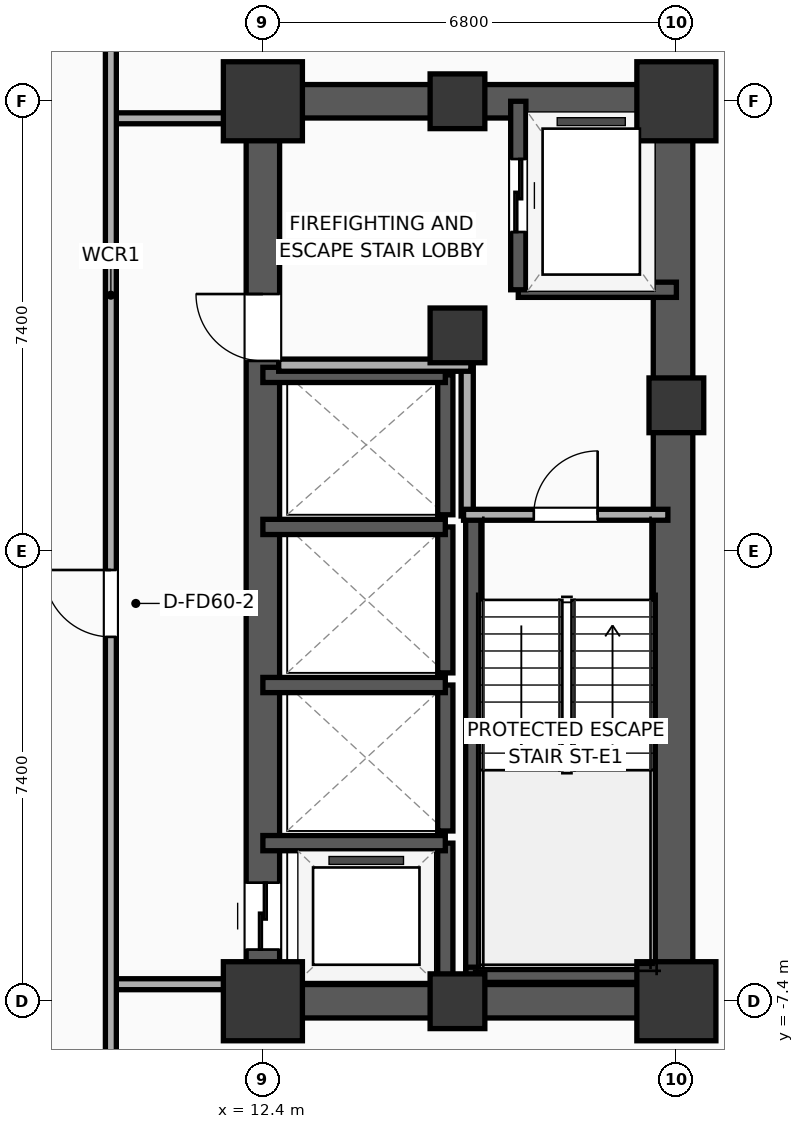
"""IFC4 building model, lengths in metres.
Left out: names, types, materials, properties, quantities, classifications, styles, units other than length and angle.
Written with IfcOpenShell. Run it as: python <this file> out.ifc"""

import sys

from ifc_helpers import new_model, si_unit, direction, frame, frame_2d, origin, origin_2d, place, context, subcontext, project, spatial, rectangle, extrude, element, fill, save


model = new_model("IFC4")
c1 = context("Model", 3, precision=1e-05, world=origin(), true_north=direction((0.0, 1.0)))
c2 = subcontext(c1, "Body", "Model", "MODEL_VIEW")
j1 = project(units=[si_unit("LENGTHUNIT", "METRE"), si_unit("PLANEANGLEUNIT", "RADIAN")], contexts=[c1])
p1 = place(None, origin())
s1 = spatial("IfcSite", under=j1, at=p1, CompositionType="ELEMENT")
p2 = place(p1, origin())
s2 = spatial("IfcBuilding", under=s1, at=p2, CompositionType="ELEMENT")
p3 = place(p2, frame((0.0, 0.0, 113.1)))
s3 = spatial("IfcBuildingStorey", under=s2, at=p3, CompositionType="ELEMENT", Elevation=113.1)
p4 = place(p3, frame((12.4, -7.4, 0.0), z_axis=(0.0, 0.0, 1.0), x_axis=(1.0, 0.0, 0.0)))
e1 = element("IfcColumn", 1, at=p4, inside=s3, PredefinedType="COLUMN", context=c2, shape_type="SweptSolid", body=[
    extrude(rectangle(XDim=1.3, YDim=1.3, at=origin_2d()), origin(), (0.0, 0.0, 1.0), 3.9),
])
p5 = place(p3, frame((15.6, 3.55, 0.0), z_axis=(0.0, 0.0, 1.0), x_axis=(1.0, 0.0, 0.0)))
e2 = element("IfcColumn", 2, at=p5, inside=s3, PredefinedType="COLUMN", context=c2, shape_type="SweptSolid", body=[
    extrude(rectangle(XDim=0.9, YDim=0.9, at=origin_2d()), origin(), (0.0, 0.0, 1.0), 3.9),
])
p6 = place(p3, frame((12.4, 7.4, 0.0), z_axis=(0.0, 0.0, 1.0), x_axis=(1.0, 0.0, 0.0)))
e3 = element("IfcColumn", 3, at=p6, inside=s3, PredefinedType="COLUMN", context=c2, shape_type="SweptSolid", body=[
    extrude(rectangle(XDim=1.3, YDim=1.3, at=origin_2d()), origin(), (0.0, 0.0, 1.0), 3.9),
])
for number, where, z_axis, x_axis in (
    (4, (15.6, -7.4, 0.0), (0.0, 0.0, 1.0), (1.0, 0.0, 0.0)),
    (5, (15.6, 7.4, 0.0), (0.0, 0.0, 1.0), (1.0, 0.0, 0.0)),
):
    element("IfcColumn", number, at=place(p3, frame(where, z_axis=z_axis, x_axis=x_axis)), inside=s3, PredefinedType="COLUMN", context=c2, shape_type="SweptSolid", body=[
        extrude(rectangle(XDim=0.9, YDim=0.9, at=origin_2d()), origin(), (0.0, 0.0, 1.0), 3.9),
    ])
p7 = place(p3, frame((19.2, -7.4, 0.0), z_axis=(0.0, 0.0, 1.0), x_axis=(1.0, 0.0, 0.0)))
e6 = element("IfcColumn", 6, at=p7, inside=s3, PredefinedType="COLUMN", context=c2, shape_type="SweptSolid", body=[
    extrude(rectangle(XDim=1.3, YDim=1.3, at=origin_2d()), origin(), (0.0, 0.0, 1.0), 3.9),
])
p8 = place(p3, frame((19.2, 2.4, 0.0), z_axis=(0.0, 0.0, 1.0), x_axis=(1.0, 0.0, 0.0)))
e7 = element("IfcColumn", 7, at=p8, inside=s3, PredefinedType="COLUMN", context=c2, shape_type="SweptSolid", body=[
    extrude(rectangle(XDim=0.9, YDim=0.9, at=origin_2d()), origin(), (0.0, 0.0, 1.0), 3.9),
])
p9 = place(p3, frame((19.2, 7.4, 0.0), z_axis=(0.0, 0.0, 1.0), x_axis=(1.0, 0.0, 0.0)))
e8 = element("IfcColumn", 8, at=p9, inside=s3, PredefinedType="COLUMN", context=c2, shape_type="SweptSolid", body=[
    extrude(rectangle(XDim=1.3, YDim=1.3, at=origin_2d()), origin(), (0.0, 0.0, 1.0), 3.9),
])
for number, where, z_axis, x_axis in (
    (9, (12.125, -7.4, 0.0), (0.0, 0.0, 1.0), (1.0, 0.0, 0.0)),
    (10, (12.125, 7.4, 0.0), (0.0, 0.0, 1.0), (1.0, 0.0, 0.0)),
):
    element("IfcWall", number, at=place(p3, frame(where, z_axis=z_axis, x_axis=x_axis)), inside=s3, PredefinedType="SHEAR", context=c2, shape_type="SweptSolid", body=[
        extrude(rectangle(XDim=7.35, YDim=0.55, at=frame_2d((3.675, 0.0))), origin(), (0.0, 0.0, 1.0), 3.65),
    ])
p10 = place(p3, frame((12.4, -7.4, 0.0), z_axis=(0.0, 0.0, 1.0), x_axis=(0.0, 1.0, 0.0)))
e11 = element("IfcWall", 11, at=p10, inside=s3, PredefinedType="SHEAR", context=c2, shape_type="SweptSolid", body=[
    extrude(rectangle(XDim=14.8, YDim=0.55, at=frame_2d((7.4, 0.0))), origin(), (0.0, 0.0, 1.0), 3.65),
])
p11 = place(p10, frame((0.85, 0.0, 0.0)))
e12 = element("IfcOpeningElement", 12, at=p11, cuts=e11, PredefinedType="OPENING", context=c2, shape_type="SweptSolid", body=[
    extrude(rectangle(XDim=1.1, YDim=2.05, at=frame_2d((0.55, 1.025))), frame((0.0, 0.285, 0.0), z_axis=(0.0, -1.0, 0.0), x_axis=(1.0, 0.0, 0.0)), (0.0, 0.0, 1.0), 0.57),
])
p12 = place(p10, frame((10.53, 0.0, 0.0)))
e13 = element("IfcOpeningElement", 13, at=p12, cuts=e11, PredefinedType="OPENING", context=c2, shape_type="SweptSolid", body=[
    extrude(rectangle(XDim=1.1, YDim=2.05, at=frame_2d((0.55, 1.025))), frame((0.0, 0.285, 0.0), z_axis=(0.0, -1.0, 0.0), x_axis=(1.0, 0.0, 0.0)), (0.0, 0.0, 1.0), 0.57),
])
p13 = place(p3, frame((19.145, -7.4, 0.0), z_axis=(0.0, 0.0, 1.0), x_axis=(0.0, 1.0, 0.0)))
e14 = element("IfcWall", 14, at=p13, inside=s3, PredefinedType="SHEAR", context=c2, shape_type="SweptSolid", body=[
    extrude(rectangle(XDim=14.8, YDim=0.65, at=frame_2d((7.4, 0.0))), origin(), (0.0, 0.0, 1.0), 3.65),
])
p14 = place(p3, frame((15.86, -7.085, 0.0), z_axis=(0.0, 0.0, 1.0), x_axis=(0.0, 1.0, 0.0)))
e15 = element("IfcWall", 15, at=p14, inside=s3, PredefinedType="SOLIDWALL", context=c2, shape_type="SweptSolid", body=[
    extrude(rectangle(XDim=7.685, YDim=0.25, at=frame_2d((3.843, 0.0))), origin(), (0.0, 0.0, 1.0), 3.65),
])
p15 = place(p3, frame((15.74, -6.965, 0.0), z_axis=(0.0, 0.0, 1.0), x_axis=(1.0, 0.0, 0.0)))
e16 = element("IfcWall", 16, at=p15, inside=s3, PredefinedType="SOLIDWALL", context=c2, shape_type="SweptSolid", body=[
    extrude(rectangle(XDim=3.46, YDim=0.25, at=frame_2d((1.73, 0.0))), origin(), (0.0, 0.0, 1.0), 3.65),
])
p16 = place(p3, frame((16.6, 4.3, 0.0), z_axis=(0.0, 0.0, 1.0), x_axis=(1.0, 0.0, 0.0)))
e17 = element("IfcWall", 17, at=p16, inside=s3, PredefinedType="SOLIDWALL", context=c2, shape_type="SweptSolid", body=[
    extrude(rectangle(XDim=2.6, YDim=0.25, at=frame_2d((1.3, 0.0))), origin(), (0.0, 0.0, 1.0), 3.65),
])
p17 = place(p3, frame((16.6, 7.4, 0.0), z_axis=(0.0, 0.0, 1.0), x_axis=(0.0, -1.0, 0.0)))
e18 = element("IfcWall", 18, at=p17, inside=s3, PredefinedType="SOLIDWALL", context=c2, shape_type="SweptSolid", body=[
    extrude(rectangle(XDim=3.1, YDim=0.25, at=frame_2d((1.55, 0.0))), origin(), (0.0, 0.0, 1.0), 3.65),
])
p18 = place(p17, frame((0.95, 0.0, 0.0)))
e19 = element("IfcOpeningElement", 19, at=p18, cuts=e18, PredefinedType="OPENING", context=c2, shape_type="SweptSolid", body=[
    extrude(rectangle(XDim=1.2, YDim=2.05, at=frame_2d((0.6, 1.025))), frame((0.0, 0.135, 0.0), z_axis=(0.0, -1.0, 0.0), x_axis=(1.0, 0.0, 0.0)), (0.0, 0.0, 1.0), 0.27),
])
p19 = place(p3, frame((15.4, -7.4, 0.0), z_axis=(0.0, 0.0, 1.0), x_axis=(0.0, 1.0, 0.0)))
e20 = element("IfcWall", 20, at=p19, inside=s3, PredefinedType="SOLIDWALL", context=c2, shape_type="SweptSolid", body=[
    extrude(rectangle(XDim=2.6, YDim=0.25, at=frame_2d((1.3, 0.0))), origin(), (0.0, 0.0, 1.0), 3.65),
])
p20 = place(p3, frame((15.4, -4.8, 0.0), z_axis=(0.0, 0.0, 1.0), x_axis=(-1.0, 0.0, 0.0)))
e21 = element("IfcWall", 21, at=p20, inside=s3, PredefinedType="SOLIDWALL", context=c2, shape_type="SweptSolid", body=[
    extrude(rectangle(XDim=3.0, YDim=0.25, at=frame_2d((1.5, 0.0))), origin(), (0.0, 0.0, 1.0), 3.65),
])
p21 = place(p3, frame((15.4, -4.6, 0.0), z_axis=(0.0, 0.0, 1.0), x_axis=(0.0, 1.0, 0.0)))
e22 = element("IfcWall", 22, at=p21, inside=s3, PredefinedType="SOLIDWALL", context=c2, shape_type="SweptSolid", body=[
    extrude(rectangle(XDim=2.4, YDim=0.25, at=frame_2d((1.2, 0.0))), origin(), (0.0, 0.0, 1.0), 3.65),
])
p22 = place(p3, frame((15.4, -2.2, 0.0), z_axis=(0.0, 0.0, 1.0), x_axis=(-1.0, 0.0, 0.0)))
e23 = element("IfcWall", 23, at=p22, inside=s3, PredefinedType="SOLIDWALL", context=c2, shape_type="SweptSolid", body=[
    extrude(rectangle(XDim=3.0, YDim=0.25, at=frame_2d((1.5, 0.0))), origin(), (0.0, 0.0, 1.0), 3.65),
])
p23 = place(p3, frame((15.4, -2.0, 0.0), z_axis=(0.0, 0.0, 1.0), x_axis=(0.0, 1.0, 0.0)))
e24 = element("IfcWall", 24, at=p23, inside=s3, PredefinedType="SOLIDWALL", context=c2, shape_type="SweptSolid", body=[
    extrude(rectangle(XDim=2.4, YDim=0.25, at=frame_2d((1.2, 0.0))), origin(), (0.0, 0.0, 1.0), 3.65),
])
p24 = place(p3, frame((15.4, 0.4, 0.0), z_axis=(0.0, 0.0, 1.0), x_axis=(-1.0, 0.0, 0.0)))
e25 = element("IfcWall", 25, at=p24, inside=s3, PredefinedType="SOLIDWALL", context=c2, shape_type="SweptSolid", body=[
    extrude(rectangle(XDim=3.0, YDim=0.25, at=frame_2d((1.5, 0.0))), origin(), (0.0, 0.0, 1.0), 3.65),
])
p25 = place(p3, frame((15.4, 0.6, 0.0), z_axis=(0.0, 0.0, 1.0), x_axis=(0.0, 1.0, 0.0)))
e26 = element("IfcWall", 26, at=p25, inside=s3, PredefinedType="SOLIDWALL", context=c2, shape_type="SweptSolid", body=[
    extrude(rectangle(XDim=2.3, YDim=0.25, at=frame_2d((1.15, 0.0))), origin(), (0.0, 0.0, 1.0), 3.65),
])
p26 = place(p3, frame((15.4, 2.9, 0.0), z_axis=(0.0, 0.0, 1.0), x_axis=(-1.0, 0.0, 0.0)))
e27 = element("IfcWall", 27, at=p26, inside=s3, PredefinedType="SOLIDWALL", context=c2, shape_type="SweptSolid", body=[
    extrude(rectangle(XDim=3.0, YDim=0.25, at=frame_2d((1.5, 0.0))), origin(), (0.0, 0.0, 1.0), 3.65),
])
p27 = place(p3, frame((15.76, 0.58, 0.0), z_axis=(0.0, 0.0, 1.0), x_axis=(0.0, 1.0, 0.0)))
e28 = element("IfcWall", 28, at=p27, inside=s3, PredefinedType="PARTITIONING", context=c2, shape_type="SweptSolid", body=[
    extrude(rectangle(XDim=2.52, YDim=0.2, at=frame_2d((1.26, 0.0))), origin(), (0.0, 0.0, 1.0), 3.65),
])
p28 = place(p3, frame((12.66, 3.06, 0.0), z_axis=(0.0, 0.0, 1.0), x_axis=(1.0, 0.0, 0.0)))
e29 = element("IfcWall", 29, at=p28, inside=s3, PredefinedType="PARTITIONING", context=c2, shape_type="SweptSolid", body=[
    extrude(rectangle(XDim=3.16, YDim=0.2, at=frame_2d((1.58, 0.0))), origin(), (0.0, 0.0, 1.0), 3.65),
])
p29 = place(p3, frame((15.7, 0.6, 0.0), z_axis=(0.0, 0.0, 1.0), x_axis=(1.0, 0.0, 0.0)))
e30 = element("IfcWall", 30, at=p29, inside=s3, PredefinedType="PARTITIONING", context=c2, shape_type="SweptSolid", body=[
    extrude(rectangle(XDim=3.36, YDim=0.18, at=frame_2d((1.68, 0.0))), origin(), (0.0, 0.0, 1.0), 3.65),
])
p30 = place(p29, frame((1.155, 0.0, 0.0)))
e31 = element("IfcOpeningElement", 31, at=p30, cuts=e30, PredefinedType="OPENING", context=c2, shape_type="SweptSolid", body=[
    extrude(rectangle(XDim=1.05, YDim=2.05, at=frame_2d((0.525, 1.025))), frame((0.0, 0.1, 0.0), z_axis=(0.0, -1.0, 0.0), x_axis=(1.0, 0.0, 0.0)), (0.0, 0.0, 1.0), 0.2),
])
for number, where, z_axis, x_axis in (
    (32, (9.88, 7.12, 0.0), (0.0, 0.0, 1.0), (1.0, 0.0, 0.0)),
    (33, (9.88, -7.12, 0.0), (0.0, 0.0, 1.0), (1.0, 0.0, 0.0)),
):
    element("IfcWall", number, at=place(p3, frame(where, z_axis=z_axis, x_axis=x_axis)), inside=s3, PredefinedType="PARTITIONING", context=c2, shape_type="SweptSolid", body=[
        extrude(rectangle(XDim=2.27, YDim=0.18, at=frame_2d((1.135, 0.0))), origin(), (0.0, 0.0, 1.0), 3.65),
    ])
p31 = place(p3, frame((9.9, -8.58, 0.0), z_axis=(0.0, 0.0, 1.0), x_axis=(0.0, 1.0, 0.0)))
e34 = element("IfcWall", 34, at=p31, inside=s3, PredefinedType="PARTITIONING", context=c2, shape_type="SweptSolid", body=[
    extrude(rectangle(XDim=17.16, YDim=0.18, at=frame_2d((8.58, 0.0))), origin(), (0.0, 0.0, 1.0), 3.65),
])
p32 = place(p31, frame((7.172, 0.0, 0.0)))
e35 = element("IfcOpeningElement", 35, at=p32, cuts=e34, PredefinedType="OPENING", context=c2, shape_type="SweptSolid", body=[
    extrude(rectangle(XDim=1.1, YDim=2.05, at=frame_2d((0.55, 1.025))), frame((0.0, 0.1, 0.0), z_axis=(0.0, -1.0, 0.0), x_axis=(1.0, 0.0, 0.0)), (0.0, 0.0, 1.0), 0.2),
])
p33 = place(p18, origin())
e36 = element("IfcDoor", 36, at=p33, inside=s3, OperationType="SLIDING_TO_LEFT", PredefinedType="DOOR", context=c2, shape_type="SweptSolid", body=[
    extrude(rectangle(XDim=1.2, YDim=2.05, at=frame_2d((0.6, 1.025))), frame((0.0, 0.025, 0.0), z_axis=(0.0, -1.0, 0.0), x_axis=(1.0, 0.0, 0.0)), (0.0, 0.0, 1.0), 0.05),
])
fill(e19, e36)
p34 = place(p11, origin())
e37 = element("IfcDoor", 37, at=p34, inside=s3, OperationType="SLIDING_TO_LEFT", PredefinedType="DOOR", context=c2, shape_type="SweptSolid", body=[
    extrude(rectangle(XDim=1.1, YDim=2.05, at=frame_2d((0.55, 1.025))), frame((0.0, 0.025, 0.0), z_axis=(0.0, -1.0, 0.0), x_axis=(1.0, 0.0, 0.0)), (0.0, 0.0, 1.0), 0.05),
])
fill(e12, e37)
p35 = place(p30, origin())
e38 = element("IfcDoor", 38, at=p35, inside=s3, OperationType="SINGLE_SWING_RIGHT", PredefinedType="DOOR", context=c2, shape_type="SweptSolid", body=[
    extrude(rectangle(XDim=1.05, YDim=2.05, at=frame_2d((0.525, 1.025))), frame((0.0, 0.025, 0.0), z_axis=(0.0, -1.0, 0.0), x_axis=(1.0, 0.0, 0.0)), (0.0, 0.0, 1.0), 0.05),
])
fill(e31, e38)
p36 = place(p32, origin())
e39 = element("IfcDoor", 39, at=p36, inside=s3, OperationType="SINGLE_SWING_RIGHT", PredefinedType="DOOR", context=c2, shape_type="SweptSolid", body=[
    extrude(rectangle(XDim=1.1, YDim=2.05, at=frame_2d((0.55, 1.025))), frame((0.0, 0.025, 0.0), z_axis=(0.0, -1.0, 0.0), x_axis=(1.0, 0.0, 0.0)), (0.0, 0.0, 1.0), 0.05),
])
fill(e35, e39)
p37 = place(p12, origin())
e40 = element("IfcDoor", 40, at=p37, inside=s3, OperationType="SINGLE_SWING_RIGHT", PredefinedType="DOOR", context=c2, shape_type="SweptSolid", body=[
    extrude(rectangle(XDim=1.1, YDim=2.05, at=frame_2d((0.55, 1.025))), frame((0.0, 0.025, 0.0), z_axis=(0.0, -1.0, 0.0), x_axis=(1.0, 0.0, 0.0)), (0.0, 0.0, 1.0), 0.05),
])
fill(e13, e40)
save(model, sys.argv[1])
